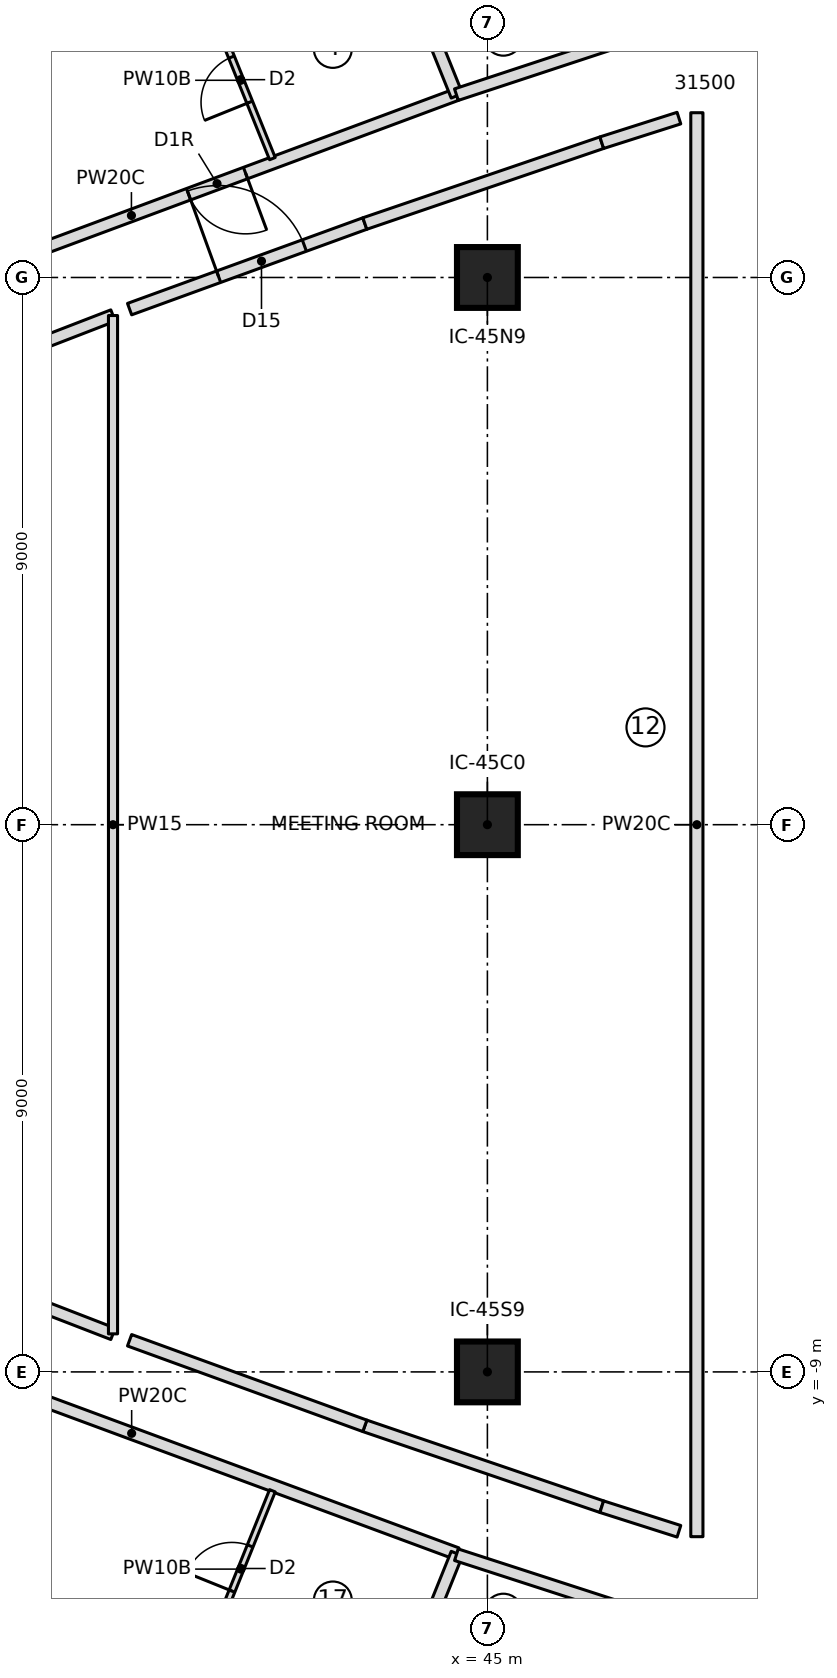
"""IFC4 building model, lengths in metres.
Left out: names, types, materials, properties, quantities, classifications, styles, units other than length and angle.
Written with IfcOpenShell. Run it as: python <this file> out.ifc"""

import sys

from ifc_helpers import new_model, si_unit, direction, frame, frame_2d, origin, origin_2d, place, context, subcontext, project, spatial, rectangle, extrude, element, fill, save


model = new_model("IFC4")
c1 = context("Model", 3, precision=1e-05, world=origin(), true_north=direction((0.0, 1.0)))
c2 = subcontext(c1, "Body", "Model", "MODEL_VIEW")
j1 = project(units=[si_unit("LENGTHUNIT", "METRE"), si_unit("PLANEANGLEUNIT", "RADIAN")], contexts=[c1])
p1 = place(None, origin())
s1 = spatial("IfcSite", under=j1, at=p1, CompositionType="ELEMENT")
p2 = place(p1, origin())
s2 = spatial("IfcBuilding", under=s1, at=p2, CompositionType="ELEMENT")
p3 = place(p2, frame((0.0, 0.0, 182.6)))
s3 = spatial("IfcBuildingStorey", under=s2, at=p3, CompositionType="ELEMENT", Elevation=182.6)
for number, where, z_axis, x_axis in (
    (1, (45.0, -9.0, 0.0), (0.0, 0.0, 1.0), (1.0, 0.0, 0.0)),
    (2, (45.0, 0.0, 0.0), (0.0, 0.0, 1.0), (1.0, 0.0, 0.0)),
    (3, (45.0, 9.0, 0.0), (0.0, 0.0, 1.0), (1.0, 0.0, 0.0)),
):
    element("IfcColumn", number, at=place(p3, frame(where, z_axis=z_axis, x_axis=x_axis)), inside=s3, PredefinedType="COLUMN", context=c2, shape_type="SweptSolid", body=[
        extrude(rectangle(XDim=1.0, YDim=1.0, at=origin_2d()), origin(), (0.0, 0.0, 1.0), 3.55),
    ])
p4 = place(p3, frame((44.49, 12.007, 0.0), z_axis=(0.0, 0.0, 1.0), x_axis=(-0.937301234234, -0.348520295396, 0.0)))
e4 = element("IfcWall", 4, at=p4, inside=s3, PredefinedType="PARTITIONING", context=c2, shape_type="SweptSolid", body=[
    extrude(rectangle(XDim=11.404, YDim=0.2, at=frame_2d((5.702, 0.0))), origin(), (0.0, 0.0, 1.0), 3.25),
])
p5 = place(p4, frame((3.7, 0.0, 0.0)))
e5 = element("IfcOpeningElement", 5, at=p5, cuts=e4, PredefinedType="OPENING", context=c2, shape_type="SweptSolid", body=[
    extrude(rectangle(XDim=1.0, YDim=2.1, at=frame_2d((0.5, 1.05))), frame((0.0, 0.11, 0.0), z_axis=(0.0, -1.0, 0.0), x_axis=(1.0, 0.0, 0.0)), (0.0, 0.0, 1.0), 0.22),
])
p6 = place(p3, frame((41.464, 10.955, 0.0), z_axis=(0.0, 0.0, 1.0), x_axis=(-0.373889095325, 0.927473419779, 0.0)))
e6 = element("IfcWall", 6, at=p6, inside=s3, PredefinedType="PARTITIONING", context=c2, shape_type="SweptSolid", body=[
    extrude(rectangle(XDim=2.778, YDim=0.1, at=frame_2d((1.389, 0.0))), origin(), (0.0, 0.0, 1.0), 3.25),
])
p7 = place(p6, frame((1.0, 0.0, 0.0)))
e7 = element("IfcOpeningElement", 7, at=p7, cuts=e6, PredefinedType="OPENING", context=c2, shape_type="SweptSolid", body=[
    extrude(rectangle(XDim=0.8, YDim=2.1, at=frame_2d((0.4, 1.05))), frame((0.0, 0.06, 0.0), z_axis=(0.0, -1.0, 0.0), x_axis=(1.0, 0.0, 0.0)), (0.0, 0.0, 1.0), 0.12),
])
p8 = place(p3, frame((44.498, 11.988, 0.0), z_axis=(0.0, 0.0, 1.0), x_axis=(-0.373877998371, 0.927477893178, 0.0)))
e8 = element("IfcWall", 8, at=p8, inside=s3, PredefinedType="PARTITIONING", context=c2, shape_type="SweptSolid", body=[
    extrude(rectangle(XDim=7.611, YDim=0.2, at=frame_2d((3.806, 0.0))), origin(), (0.0, 0.0, 1.0), 3.25),
])
p9 = place(p3, frame((33.801, -8.032, 0.0), z_axis=(0.0, 0.0, 1.0), x_axis=(0.937916242759, -0.346861819127, 0.0)))
e9 = element("IfcWall", 9, at=p9, inside=s3, PredefinedType="PARTITIONING", context=c2, shape_type="SweptSolid", body=[
    extrude(rectangle(XDim=11.405, YDim=0.2, at=frame_2d((5.702, 0.0))), origin(), (0.0, 0.0, 1.0), 3.25),
])
p10 = place(p9, frame((1.15, 0.0, 0.0)))
e10 = element("IfcOpeningElement", 10, at=p10, cuts=e9, PredefinedType="OPENING", context=c2, shape_type="SweptSolid", body=[
    extrude(rectangle(XDim=1.0, YDim=2.1, at=frame_2d((0.5, 1.05))), frame((0.0, 0.11, 0.0), z_axis=(0.0, -1.0, 0.0), x_axis=(1.0, 0.0, 0.0)), (0.0, 0.0, 1.0), 0.22),
])
p11 = place(p3, frame((40.426, -13.532, 0.0), z_axis=(0.0, 0.0, 1.0), x_axis=(0.373889095325, 0.927473419779, 0.0)))
e11 = element("IfcWall", 11, at=p11, inside=s3, PredefinedType="PARTITIONING", context=c2, shape_type="SweptSolid", body=[
    extrude(rectangle(XDim=2.778, YDim=0.1, at=frame_2d((1.389, 0.0))), origin(), (0.0, 0.0, 1.0), 3.25),
])
p12 = place(p11, frame((1.0, 0.0, 0.0)))
e12 = element("IfcOpeningElement", 12, at=p12, cuts=e11, PredefinedType="OPENING", context=c2, shape_type="SweptSolid", body=[
    extrude(rectangle(XDim=0.8, YDim=2.1, at=frame_2d((0.4, 1.05))), frame((0.0, 0.06, 0.0), z_axis=(0.0, -1.0, 0.0), x_axis=(1.0, 0.0, 0.0)), (0.0, 0.0, 1.0), 0.12),
])
p13 = place(p3, frame((41.652, -19.048, 0.0), z_axis=(0.0, 0.0, 1.0), x_axis=(0.373877998371, 0.927477893178, 0.0)))
e13 = element("IfcWall", 13, at=p13, inside=s3, PredefinedType="PARTITIONING", context=c2, shape_type="SweptSolid", body=[
    extrude(rectangle(XDim=7.611, YDim=0.2, at=frame_2d((3.806, 0.0))), origin(), (0.0, 0.0, 1.0), 3.25),
])
p14 = place(p3, frame((35.276, 6.994, 0.0), z_axis=(0.0, 0.0, 1.0), x_axis=(0.932681040007, 0.360702200731, 0.0)))
e14 = element("IfcWall", 14, at=p14, inside=s3, PredefinedType="PARTITIONING", context=c2, shape_type="SweptSolid", body=[
    extrude(rectangle(XDim=3.825, YDim=0.2, at=frame_2d((1.913, 0.0))), origin(), (0.0, 0.0, 1.0), 3.25),
])
p15 = place(p14, frame((1.413, 0.0, 0.0)))
e15 = element("IfcOpeningElement", 15, at=p15, cuts=e14, PredefinedType="OPENING", context=c2, shape_type="SweptSolid", body=[
    extrude(rectangle(XDim=1.0, YDim=2.1, at=frame_2d((0.5, 1.05))), frame((0.0, 0.11, 0.0), z_axis=(0.0, -1.0, 0.0), x_axis=(1.0, 0.0, 0.0)), (0.0, 0.0, 1.0), 0.22),
])
p16 = place(p3, frame((38.843, -8.374, 0.0), z_axis=(0.0, 0.0, 1.0), x_axis=(-0.932681040007, 0.360702200731, 0.0)))
e16 = element("IfcWall", 16, at=p16, inside=s3, PredefinedType="PARTITIONING", context=c2, shape_type="SweptSolid", body=[
    extrude(rectangle(XDim=3.825, YDim=0.2, at=frame_2d((1.913, 0.0))), origin(), (0.0, 0.0, 1.0), 3.25),
])
p17 = place(p3, frame((38.843, -8.374, 0.0), z_axis=(0.0, 0.0, 1.0), x_axis=(0.0, 1.0, 0.0)))
e17 = element("IfcWall", 17, at=p17, inside=s3, PredefinedType="PARTITIONING", context=c2, shape_type="SweptSolid", body=[
    extrude(rectangle(XDim=16.748, YDim=0.15, at=frame_2d((8.374, 0.0))), origin(), (0.0, 0.0, 1.0), 3.25),
])
p18 = place(p3, frame((39.115, 8.479, 0.0), z_axis=(0.0, 0.0, 1.0), x_axis=(0.939727613335, 0.341923986779, 0.0)))
e18 = element("IfcWall", 18, at=p18, inside=s3, PredefinedType="PARTITIONING", context=c2, shape_type="SweptSolid", body=[
    extrude(rectangle(XDim=4.117, YDim=0.2, at=frame_2d((2.059, 0.0))), origin(), (0.0, 0.0, 1.0), 3.25),
])
p19 = place(p18, frame((1.559, 0.0, 0.0)))
e19 = element("IfcOpeningElement", 19, at=p19, cuts=e18, PredefinedType="OPENING", context=c2, shape_type="SweptSolid", body=[
    extrude(rectangle(XDim=1.5, YDim=2.1, at=frame_2d((0.75, 1.05))), frame((0.0, 0.11, 0.0), z_axis=(0.0, -1.0, 0.0), x_axis=(1.0, 0.0, 0.0)), (0.0, 0.0, 1.0), 0.22),
])
for number, where, z_axis, x_axis in (
    (20, (42.984, 9.887, 0.0), (0.0, 0.0, 1.0), (0.946, 0.323, 0.0)),
    (21, (46.881, -11.217, 0.0), (0.0, 0.0, 1.0), (-0.946, 0.323, 0.0)),
    (22, (42.984, -9.887, 0.0), (0.0, 0.0, 1.0), (-0.94, 0.342, 0.0)),
):
    element("IfcWall", number, at=place(p3, frame(where, z_axis=z_axis, x_axis=x_axis)), inside=s3, PredefinedType="PARTITIONING", context=c2, shape_type="SweptSolid", body=[
        extrude(rectangle(XDim=4.117, YDim=0.2, at=frame_2d((2.059, 0.0))), origin(), (0.0, 0.0, 1.0), 3.25),
    ])
p20 = place(p3, frame((48.15, 13.213, 0.0), z_axis=(0.0, 0.0, 1.0), x_axis=(-0.949729856115, -0.313070599711, 0.0)))
e23 = element("IfcWall", 23, at=p20, inside=s3, PredefinedType="PARTITIONING", context=c2, shape_type="SweptSolid", body=[
    extrude(rectangle(XDim=3.853, YDim=0.2, at=frame_2d((1.927, 0.0))), origin(), (0.0, 0.0, 1.0), 3.25),
])
p21 = place(p3, frame((44.49, -12.007, 0.0), z_axis=(0.0, 0.0, 1.0), x_axis=(0.951228355446, -0.308487626648, 0.0)))
e24 = element("IfcWall", 24, at=p21, inside=s3, PredefinedType="PARTITIONING", context=c2, shape_type="SweptSolid", body=[
    extrude(rectangle(XDim=3.847, YDim=0.2, at=frame_2d((1.924, 0.0))), origin(), (0.0, 0.0, 1.0), 3.25),
])
for number, where, z_axis, x_axis in (
    (25, (46.881, 11.217, 0.0), (0.0, 0.0, 1.0), (0.953, 0.304, 0.0)),
    (26, (48.15, -11.621, 0.0), (0.0, 0.0, 1.0), (-0.953, 0.304, 0.0)),
):
    element("IfcWall", number, at=place(p3, frame(where, z_axis=z_axis, x_axis=x_axis)), inside=s3, PredefinedType="PARTITIONING", context=c2, shape_type="SweptSolid", body=[
        extrude(rectangle(XDim=1.332, YDim=0.2, at=frame_2d((0.666, 0.0))), origin(), (0.0, 0.0, 1.0), 3.25),
    ])
p22 = place(p3, frame((48.445, 11.71, 0.0), z_axis=(0.0, 0.0, 1.0), x_axis=(0.0, -1.0, 0.0)))
e27 = element("IfcWall", 27, at=p22, inside=s3, PredefinedType="PARTITIONING", context=c2, shape_type="SweptSolid", body=[
    extrude(rectangle(XDim=23.42, YDim=0.2, at=frame_2d((11.71, 0.0))), origin(), (0.0, 0.0, 1.0), 3.25),
])
p23 = place(p7, origin())
e28 = element("IfcDoor", 28, at=p23, inside=s3, OperationType="SINGLE_SWING_LEFT", PredefinedType="DOOR", context=c2, shape_type="SweptSolid", body=[
    extrude(rectangle(XDim=0.8, YDim=2.1, at=frame_2d((0.4, 1.05))), frame((0.0, 0.025, 0.0), z_axis=(0.0, -1.0, 0.0), x_axis=(1.0, 0.0, 0.0)), (0.0, 0.0, 1.0), 0.05),
])
fill(e7, e28)
p24 = place(p5, origin())
e29 = element("IfcDoor", 29, at=p24, inside=s3, OperationType="SINGLE_SWING_RIGHT", PredefinedType="DOOR", context=c2, shape_type="SweptSolid", body=[
    extrude(rectangle(XDim=1.0, YDim=2.1, at=frame_2d((0.5, 1.05))), frame((0.0, 0.025, 0.0), z_axis=(0.0, -1.0, 0.0), x_axis=(1.0, 0.0, 0.0)), (0.0, 0.0, 1.0), 0.05),
])
fill(e5, e29)
p25 = place(p12, origin())
e30 = element("IfcDoor", 30, at=p25, inside=s3, OperationType="SINGLE_SWING_LEFT", PredefinedType="DOOR", context=c2, shape_type="SweptSolid", body=[
    extrude(rectangle(XDim=0.8, YDim=2.1, at=frame_2d((0.4, 1.05))), frame((0.0, 0.025, 0.0), z_axis=(0.0, -1.0, 0.0), x_axis=(1.0, 0.0, 0.0)), (0.0, 0.0, 1.0), 0.05),
])
fill(e12, e30)
p26 = place(p19, origin())
e31 = element("IfcDoor", 31, at=p26, inside=s3, OperationType="DOUBLE_DOOR_SINGLE_SWING", PredefinedType="DOOR", context=c2, shape_type="SweptSolid", body=[
    extrude(rectangle(XDim=1.5, YDim=2.1, at=frame_2d((0.75, 1.05))), frame((0.0, 0.025, 0.0), z_axis=(0.0, -1.0, 0.0), x_axis=(1.0, 0.0, 0.0)), (0.0, 0.0, 1.0), 0.05),
])
fill(e19, e31)
save(model, sys.argv[1])
